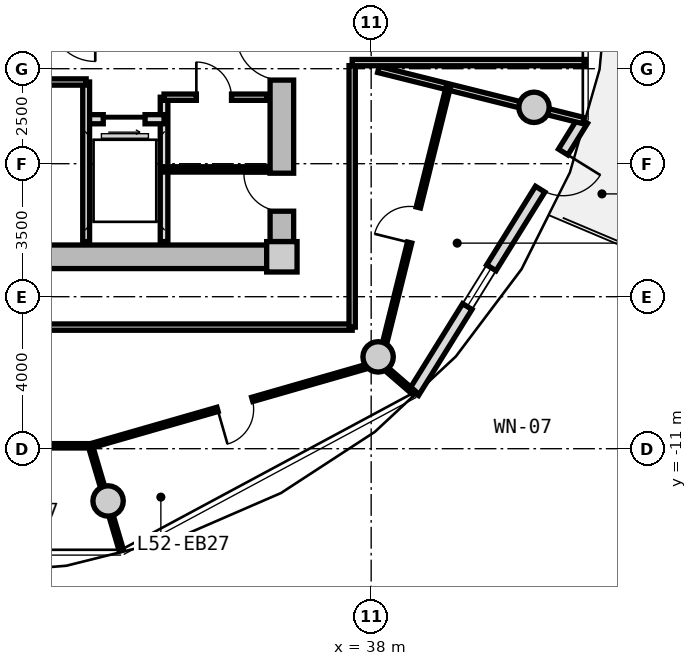
"""IFC4 building model, lengths in metres.
Left out: names, types, materials, properties, quantities, classifications, styles, units other than length and angle.
Written with IfcOpenShell. Run it as: python <this file> out.ifc"""

import sys

from ifc_helpers import new_model, si_unit, direction, frame, frame_2d, origin, origin_2d, place, context, subcontext, project, spatial, rectangle, circle, extrude, source, transform, mapped, element, fill, save


model = new_model("IFC4")
c1 = context("Model", 3, precision=1e-05, world=origin(), true_north=direction((0.0, 1.0)))
c2 = subcontext(c1, "Body", "Model", "MODEL_VIEW")
j1 = project(units=[si_unit("LENGTHUNIT", "METRE"), si_unit("PLANEANGLEUNIT", "RADIAN")], contexts=[c1])
p1 = place(None, origin())
s1 = spatial("IfcSite", under=j1, at=p1, CompositionType="ELEMENT")
p2 = place(p1, origin())
s2 = spatial("IfcBuilding", under=s1, at=p2, CompositionType="ELEMENT")
p3 = place(p2, frame((0.0, 0.0, 167.85)))
s3 = spatial("IfcBuildingStorey", under=s2, at=p3, CompositionType="ELEMENT", Elevation=167.85)
m1 = source(origin(), c2, "Body", "SweptSolid", [
    extrude(rectangle(XDim=0.8, YDim=0.8, at=origin_2d()), origin(), (0.0, 0.0, 1.0), 3.05),
])
p4 = place(p3, frame((35.65, -5.95, 0.0), z_axis=(0.0, 0.0, 1.0), x_axis=(1.0, 0.0, 0.0)))
e1 = element("IfcColumn", 1, at=p4, inside=s3, PredefinedType="COLUMN", context=c2, shape_type="MappedRepresentation", body=[
    mapped(m1, transform((0.0, 0.0, 0.0), x_axis=(1.0, 0.0, 0.0), y_axis=(0.0, 1.0, 0.0), z_axis=(0.0, 0.0, 1.0), scale=1.0)),
])
m2 = source(origin(), c2, "Body", "SweptSolid", [
    extrude(rectangle(XDim=14.5, YDim=0.62, at=frame_2d((7.25, 0.0))), origin(), (0.0, 0.0, 1.0), 2.81),
])
p5 = place(p3, frame((35.25, -5.95, 0.0), z_axis=(0.0, 0.0, 1.0), x_axis=(-1.0, 0.0, 0.0)))
e2 = element("IfcWall", 2, at=p5, inside=s3, PredefinedType="SHEAR", context=c2, shape_type="MappedRepresentation", body=[
    mapped(m2, transform((0.0, 0.0, 0.0), x_axis=(1.0, 0.0, 0.0), y_axis=(0.0, 1.0, 0.0), z_axis=(0.0, 0.0, 1.0), scale=1.0)),
])
m3 = source(origin(), c2, "Body", "SweptSolid", [
    extrude(rectangle(XDim=11.1, YDim=0.62, at=frame_2d((5.55, 0.0))), origin(), (0.0, 0.0, 1.0), 2.81),
])
p6 = place(p3, frame((35.65, 5.55, 0.0), z_axis=(0.0, 0.0, 1.0), x_axis=(0.0, -1.0, 0.0)))
e3 = element("IfcWall", 3, at=p6, inside=s3, PredefinedType="SHEAR", context=c2, shape_type="MappedRepresentation", body=[
    mapped(m3, transform((0.0, 0.0, 0.0), x_axis=(1.0, 0.0, 0.0), y_axis=(0.0, 1.0, 0.0), z_axis=(0.0, 0.0, 1.0), scale=1.0)),
])
p7 = place(p6, frame((5.65, 0.0, 0.0)))
e4 = element("IfcOpeningElement", 4, at=p7, cuts=e3, PredefinedType="OPENING", context=c2, shape_type="SweptSolid", body=[
    extrude(rectangle(XDim=1.2, YDim=2.15, at=frame_2d((0.6, 1.075))), frame((0.0, 0.32, 0.0), z_axis=(0.0, -1.0, 0.0), x_axis=(1.0, 0.0, 0.0)), (0.0, 0.0, 1.0), 0.64),
])
p8 = place(p6, frame((9.3, 0.0, 0.0)))
e5 = element("IfcOpeningElement", 5, at=p8, cuts=e3, PredefinedType="OPENING", context=c2, shape_type="SweptSolid", body=[
    extrude(rectangle(XDim=1.0, YDim=2.1, at=frame_2d((0.5, 1.05))), frame((0.0, 0.32, 0.0), z_axis=(0.0, -1.0, 0.0), x_axis=(1.0, 0.0, 0.0)), (0.0, 0.0, 1.0), 0.64),
])
m4 = source(origin(), c2, "Body", "SweptSolid", [
    extrude(circle(Radius=0.4, at=origin_2d()), origin(), (0.0, 0.0, 1.0), 3.05),
])
for number, where, z_axis, x_axis in (
    (6, (31.077, -12.375, 0.0), (0.0, 0.0, 1.0), (1.0, 0.0, 0.0)),
    (7, (38.183, -8.584, 0.0), (0.0, 0.0, 1.0), (1.0, 0.0, 0.0)),
    (8, (42.285, -2.016, 0.0), (0.0, 0.0, 1.0), (1.0, 0.0, 0.0)),
):
    element("IfcColumn", number, at=place(p3, frame(where, z_axis=z_axis, x_axis=x_axis)), inside=s3, PredefinedType="COLUMN", context=c2, shape_type="MappedRepresentation", body=[
        mapped(m4, transform((0.0, 0.0, 0.0), x_axis=(1.0, 0.0, 0.0), y_axis=(0.0, 1.0, 0.0), z_axis=(0.0, 0.0, 1.0), scale=1.0)),
    ])
m5 = source(origin(), c2, "Body", "SweptSolid", [
    extrude(rectangle(XDim=8.431, YDim=0.29, at=frame_2d((4.216, 0.0))), origin(), (0.0, 0.0, 1.0), 2.81),
])
p9 = place(p3, frame((43.57, -2.361, 0.0), z_axis=(0.0, 0.0, 1.0), x_axis=(-0.527377998418, -0.849630770855, 0.0)))
e9 = element("IfcWall", 9, at=p9, inside=s3, PredefinedType="SOLIDWALL", context=c2, shape_type="MappedRepresentation", body=[
    mapped(m5, transform((0.0, 0.0, 0.0), x_axis=(1.0, 0.0, 0.0), y_axis=(0.0, 1.0, 0.0), z_axis=(0.0, 0.0, 1.0), scale=1.0)),
])
p10 = place(p9, frame((0.98, 0.0, 0.0)))
e10 = element("IfcOpeningElement", 10, at=p10, cuts=e9, PredefinedType="OPENING", context=c2, shape_type="SweptSolid", body=[
    extrude(rectangle(XDim=1.15, YDim=2.25, at=frame_2d((0.575, 1.125))), frame((0.0, 0.155, 0.0), z_axis=(0.0, -1.0, 0.0), x_axis=(1.0, 0.0, 0.0)), (0.0, 0.0, 1.0), 0.31),
])
p11 = place(p9, frame((4.566, 0.0, 0.85)))
e11 = element("IfcOpeningElement", 11, at=p11, cuts=e9, PredefinedType="OPENING", context=c2, shape_type="SweptSolid", body=[
    extrude(rectangle(XDim=1.2, YDim=1.5, at=frame_2d((0.6, 0.75))), frame((0.0, 0.155, 0.0), z_axis=(0.0, -1.0, 0.0), x_axis=(1.0, 0.0, 0.0)), (0.0, 0.0, 1.0), 0.31),
])
m6 = source(origin(), c2, "Body", "SweptSolid", [
    extrude(rectangle(XDim=3.8, YDim=0.2, at=frame_2d((1.9, 0.0))), origin(), (0.0, 0.0, 1.0), 2.795),
])
p12 = place(p3, frame((32.55, -5.55, 0.0), z_axis=(0.0, 0.0, 1.0), x_axis=(0.0, 1.0, 0.0)))
e12 = element("IfcWall", 12, at=p12, inside=s3, PredefinedType="PARTITIONING", context=c2, shape_type="MappedRepresentation", body=[
    mapped(m6, transform((0.0, 0.0, 0.0), x_axis=(1.0, 0.0, 0.0), y_axis=(0.0, 1.0, 0.0), z_axis=(0.0, 0.0, 1.0), scale=1.0)),
])
m7 = source(origin(), c2, "Body", "SweptSolid", [
    extrude(rectangle(XDim=2.05, YDim=0.24, at=frame_2d((1.025, 0.0))), origin(), (0.0, 0.0, 1.0), 2.795),
])
p13 = place(p3, frame((30.5, -2.33, 0.0), z_axis=(0.0, 0.0, 1.0), x_axis=(1.0, 0.0, 0.0)))
e13 = element("IfcWall", 13, at=p13, inside=s3, PredefinedType="PARTITIONING", context=c2, shape_type="MappedRepresentation", body=[
    mapped(m7, transform((0.0, 0.0, 0.0), x_axis=(1.0, 0.0, 0.0), y_axis=(0.0, 1.0, 0.0), z_axis=(0.0, 0.0, 1.0), scale=1.0)),
])
p14 = place(p13, frame((0.45, 0.0, 0.0)))
e14 = element("IfcOpeningElement", 14, at=p14, cuts=e13, PredefinedType="OPENING", context=c2, shape_type="SweptSolid", body=[
    extrude(rectangle(XDim=1.1, YDim=2.2, at=frame_2d((0.55, 1.1))), frame((0.0, 0.13, 0.0), z_axis=(0.0, -1.0, 0.0), x_axis=(1.0, 0.0, 0.0)), (0.0, 0.0, 1.0), 0.26),
])
m8 = source(origin(), c2, "Body", "SweptSolid", [
    extrude(rectangle(XDim=4.2, YDim=0.18, at=frame_2d((2.1, 0.0))), origin(), (0.0, 0.0, 1.0), 2.795),
])
p15 = place(p3, frame((30.5, -5.55, 0.0), z_axis=(0.0, 0.0, 1.0), x_axis=(0.0, 1.0, 0.0)))
e15 = element("IfcWall", 15, at=p15, inside=s3, PredefinedType="PARTITIONING", context=c2, shape_type="MappedRepresentation", body=[
    mapped(m8, transform((0.0, 0.0, 0.0), x_axis=(1.0, 0.0, 0.0), y_axis=(0.0, 1.0, 0.0), z_axis=(0.0, 0.0, 1.0), scale=1.0)),
])
m9 = source(origin(), c2, "Body", "SweptSolid", [
    extrude(rectangle(XDim=4.77, YDim=0.165, at=frame_2d((2.385, 0.0))), origin(), (0.0, 0.0, 1.0), 2.795),
])
p16 = place(p3, frame((25.73, -1.35, 0.0), z_axis=(0.0, 0.0, 1.0), x_axis=(1.0, 0.0, 0.0)))
e16 = element("IfcWall", 16, at=p16, inside=s3, PredefinedType="PARTITIONING", context=c2, shape_type="MappedRepresentation", body=[
    mapped(m9, transform((0.0, 0.0, 0.0), x_axis=(1.0, 0.0, 0.0), y_axis=(0.0, 1.0, 0.0), z_axis=(0.0, 0.0, 1.0), scale=1.0)),
])
p17 = place(p16, frame((1.85, 0.0, 0.0)))
e17 = element("IfcOpeningElement", 17, at=p17, cuts=e16, PredefinedType="OPENING", context=c2, shape_type="SweptSolid", body=[
    extrude(rectangle(XDim=1.0, YDim=2.1, at=frame_2d((0.5, 1.05))), frame((0.0, 0.093, 0.0), z_axis=(0.0, -1.0, 0.0), x_axis=(1.0, 0.0, 0.0)), (0.0, 0.0, 1.0), 0.185),
])
m10 = source(origin(), c2, "Body", "SweptSolid", [
    extrude(rectangle(XDim=2.7, YDim=0.165, at=frame_2d((1.35, 0.0))), origin(), (0.0, 0.0, 1.0), 2.795),
])
p18 = place(p3, frame((32.55, -1.75, 0.0), z_axis=(0.0, 0.0, 1.0), x_axis=(1.0, 0.0, 0.0)))
e18 = element("IfcWall", 18, at=p18, inside=s3, PredefinedType="PARTITIONING", context=c2, shape_type="MappedRepresentation", body=[
    mapped(m10, transform((0.0, 0.0, 0.0), x_axis=(1.0, 0.0, 0.0), y_axis=(0.0, 1.0, 0.0), z_axis=(0.0, 0.0, 1.0), scale=1.0)),
])
p19 = place(p18, frame((0.85, 0.0, 0.0)))
e19 = element("IfcOpeningElement", 19, at=p19, cuts=e18, PredefinedType="OPENING", context=c2, shape_type="SweptSolid", body=[
    extrude(rectangle(XDim=0.925, YDim=2.1, at=frame_2d((0.462, 1.05))), frame((0.0, 0.093, 0.0), z_axis=(0.0, -1.0, 0.0), x_axis=(1.0, 0.0, 0.0)), (0.0, 0.0, 1.0), 0.185),
])
m11 = source(origin(), c2, "Body", "SweptSolid", [
    extrude(rectangle(XDim=2.7, YDim=0.14, at=frame_2d((1.35, 0.0))), origin(), (0.0, 0.0, 1.0), 2.795),
])
p20 = place(p3, frame((32.55, -3.65, 0.0), z_axis=(0.0, 0.0, 1.0), x_axis=(1.0, 0.0, 0.0)))
e20 = element("IfcWall", 20, at=p20, inside=s3, PredefinedType="PARTITIONING", context=c2, shape_type="MappedRepresentation", body=[
    mapped(m11, transform((0.0, 0.0, 0.0), x_axis=(1.0, 0.0, 0.0), y_axis=(0.0, 1.0, 0.0), z_axis=(0.0, 0.0, 1.0), scale=1.0)),
])
m12 = source(origin(), c2, "Body", "SweptSolid", [
    extrude(rectangle(XDim=19.0, YDim=0.165, at=frame_2d((9.5, 0.0))), origin(), (0.0, 0.0, 1.0), 2.795),
])
p21 = place(p3, frame((37.5, -7.8, 0.0), z_axis=(0.0, 0.0, 1.0), x_axis=(-1.0, 0.0, 0.0)))
e21 = element("IfcWall", 21, at=p21, inside=s3, PredefinedType="PARTITIONING", context=c2, shape_type="MappedRepresentation", body=[
    mapped(m12, transform((0.0, 0.0, 0.0), x_axis=(1.0, 0.0, 0.0), y_axis=(0.0, 1.0, 0.0), z_axis=(0.0, 0.0, 1.0), scale=1.0)),
])
p22 = place(p21, frame((8.061, 0.0, 0.0)))
e22 = element("IfcOpeningElement", 22, at=p22, cuts=e21, PredefinedType="OPENING", context=c2, shape_type="SweptSolid", body=[
    extrude(rectangle(XDim=1.05, YDim=2.15, at=frame_2d((0.525, 1.075))), frame((0.0, 0.093, 0.0), z_axis=(0.0, -1.0, 0.0), x_axis=(1.0, 0.0, 0.0)), (0.0, 0.0, 1.0), 0.185),
])
m13 = source(origin(), c2, "Body", "SweptSolid", [
    extrude(rectangle(XDim=6.88, YDim=0.165, at=frame_2d((3.44, 0.0))), origin(), (0.0, 0.0, 1.0), 2.795),
])
p23 = place(p3, frame((37.5, -0.92, 0.0), z_axis=(0.0, 0.0, 1.0), x_axis=(0.0, -1.0, 0.0)))
e23 = element("IfcWall", 23, at=p23, inside=s3, PredefinedType="PARTITIONING", context=c2, shape_type="MappedRepresentation", body=[
    mapped(m13, transform((0.0, 0.0, 0.0), x_axis=(1.0, 0.0, 0.0), y_axis=(0.0, 1.0, 0.0), z_axis=(0.0, 0.0, 1.0), scale=1.0)),
])
m14 = source(origin(), c2, "Body", "SweptSolid", [
    extrude(rectangle(XDim=5.564, YDim=0.165, at=frame_2d((2.782, 0.0))), origin(), (0.0, 0.0, 1.0), 2.345),
])
p24 = place(p3, frame((38.19, -1.02, 0.0), z_axis=(0.0, 0.0, 1.0), x_axis=(0.97031260977, -0.241854169533, 0.0)))
e24 = element("IfcWall", 24, at=p24, inside=s3, PredefinedType="PARTITIONING", context=c2, shape_type="MappedRepresentation", body=[
    mapped(m14, transform((0.0, 0.0, 0.0), x_axis=(1.0, 0.0, 0.0), y_axis=(0.0, 1.0, 0.0), z_axis=(0.0, 0.0, 1.0), scale=1.0)),
])
m15 = source(origin(), c2, "Body", "SweptSolid", [
    extrude(rectangle(XDim=6.139, YDim=0.165, at=frame_2d((3.069, 0.0))), origin(), (0.0, 0.0, 1.0), 2.795),
])
p25 = place(p3, frame((43.639, -0.84, 0.0), z_axis=(0.0, 0.0, 1.0), x_axis=(-1.0, 0.0, 0.0)))
e25 = element("IfcWall", 25, at=p25, inside=s3, PredefinedType="PARTITIONING", context=c2, shape_type="MappedRepresentation", body=[
    mapped(m15, transform((0.0, 0.0, 0.0), x_axis=(1.0, 0.0, 0.0), y_axis=(0.0, 1.0, 0.0), z_axis=(0.0, 0.0, 1.0), scale=1.0)),
])
m16 = source(origin(), c2, "Body", "SweptSolid", [
    extrude(rectangle(XDim=7.274, YDim=0.115, at=frame_2d((3.637, 0.0))), origin(), (0.0, 0.0, 1.0), 2.795),
])
p26 = place(p3, frame((23.338, -10.924, 0.0), z_axis=(0.0, 0.0, 1.0), x_axis=(1.0, 0.0, 0.0)))
e26 = element("IfcWall", 26, at=p26, inside=s3, PredefinedType="PARTITIONING", context=c2, shape_type="MappedRepresentation", body=[
    mapped(m16, transform((0.0, 0.0, 0.0), x_axis=(1.0, 0.0, 0.0), y_axis=(0.0, 1.0, 0.0), z_axis=(0.0, 0.0, 1.0), scale=1.0)),
])
p27 = place(p26, frame((3.162, 0.0, 0.0)))
e27 = element("IfcOpeningElement", 27, at=p27, cuts=e26, PredefinedType="OPENING", context=c2, shape_type="SweptSolid", body=[
    extrude(rectangle(XDim=0.95, YDim=2.1, at=frame_2d((0.475, 1.05))), frame((0.0, 0.067, 0.0), z_axis=(0.0, -1.0, 0.0), x_axis=(1.0, 0.0, 0.0)), (0.0, 0.0, 1.0), 0.135),
])
m17 = source(origin(), c2, "Body", "SweptSolid", [
    extrude(rectangle(XDim=7.911, YDim=0.115, at=frame_2d((3.955, 0.0))), origin(), (0.0, 0.0, 1.0), 2.345),
])
p28 = place(p3, frame((30.613, -10.927, 0.0), z_axis=(0.0, 0.0, 1.0), x_axis=(0.961104741235, 0.276184134908, 0.0)))
e28 = element("IfcWall", 28, at=p28, inside=s3, PredefinedType="PARTITIONING", context=c2, shape_type="MappedRepresentation", body=[
    mapped(m17, transform((0.0, 0.0, 0.0), x_axis=(1.0, 0.0, 0.0), y_axis=(0.0, 1.0, 0.0), z_axis=(0.0, 0.0, 1.0), scale=1.0)),
])
p29 = place(p28, frame((3.48, 0.0, 0.0)))
e29 = element("IfcOpeningElement", 29, at=p29, cuts=e28, PredefinedType="OPENING", context=c2, shape_type="SweptSolid", body=[
    extrude(rectangle(XDim=0.95, YDim=2.1, at=frame_2d((0.475, 1.05))), frame((0.0, 0.067, 0.0), z_axis=(0.0, -1.0, 0.0), x_axis=(1.0, 0.0, 0.0)), (0.0, 0.0, 1.0), 0.135),
])
m18 = source(origin(), c2, "Body", "SweptSolid", [
    extrude(rectangle(XDim=2.871, YDim=0.115, at=frame_2d((1.436, 0.0))), origin(), (0.0, 0.0, 1.0), 2.345),
])
p30 = place(p3, frame((30.613, -10.927, 0.0), z_axis=(0.0, 0.0, 1.0), x_axis=(0.283616326168, -0.958937839242, 0.0)))
e30 = element("IfcWall", 30, at=p30, inside=s3, PredefinedType="PARTITIONING", context=c2, shape_type="MappedRepresentation", body=[
    mapped(m18, transform((0.0, 0.0, 0.0), x_axis=(1.0, 0.0, 0.0), y_axis=(0.0, 1.0, 0.0), z_axis=(0.0, 0.0, 1.0), scale=1.0)),
])
m19 = source(origin(), c2, "Body", "SweptSolid", [
    extrude(rectangle(XDim=7.492, YDim=0.115, at=frame_2d((3.746, 0.0))), origin(), (0.0, 0.0, 1.0), 2.345),
])
p31 = place(p3, frame((38.223, -8.749, 0.0), z_axis=(0.0, 0.0, 1.0), x_axis=(0.24104782819, 0.970513237686, 0.0)))
e31 = element("IfcWall", 31, at=p31, inside=s3, PredefinedType="PARTITIONING", context=c2, shape_type="MappedRepresentation", body=[
    mapped(m19, transform((0.0, 0.0, 0.0), x_axis=(1.0, 0.0, 0.0), y_axis=(0.0, 1.0, 0.0), z_axis=(0.0, 0.0, 1.0), scale=1.0)),
])
p32 = place(p31, frame((3.271, 0.0, 0.0)))
e32 = element("IfcOpeningElement", 32, at=p32, cuts=e31, PredefinedType="OPENING", context=c2, shape_type="SweptSolid", body=[
    extrude(rectangle(XDim=0.95, YDim=2.1, at=frame_2d((0.475, 1.05))), frame((0.0, 0.067, 0.0), z_axis=(0.0, -1.0, 0.0), x_axis=(1.0, 0.0, 0.0)), (0.0, 0.0, 1.0), 0.135),
])
m20 = source(origin(), c2, "Body", "SweptSolid", [
    extrude(rectangle(XDim=1.208, YDim=0.115, at=frame_2d((0.604, 0.0))), origin(), (0.0, 0.0, 1.0), 2.795),
])
p33 = place(p3, frame((38.223, -8.749, 0.0), z_axis=(0.0, 0.0, 1.0), x_axis=(0.75668207681, -0.653783018008, 0.0)))
e33 = element("IfcWall", 33, at=p33, inside=s3, PredefinedType="PARTITIONING", context=c2, shape_type="MappedRepresentation", body=[
    mapped(m20, transform((0.0, 0.0, 0.0), x_axis=(1.0, 0.0, 0.0), y_axis=(0.0, 1.0, 0.0), z_axis=(0.0, 0.0, 1.0), scale=1.0)),
])
m21 = source(origin(), c2, "Body", "SweptSolid", [
    extrude(rectangle(XDim=1.15, YDim=2.25, at=frame_2d((0.575, 1.125))), frame((0.0, 0.025, 0.0), z_axis=(0.0, -1.0, 0.0), x_axis=(1.0, 0.0, 0.0)), (0.0, 0.0, 1.0), 0.05),
])
p34 = place(p10, origin())
e34 = element("IfcDoor", 34, at=p34, inside=s3, OperationType="SINGLE_SWING_LEFT", PredefinedType="DOOR", context=c2, shape_type="MappedRepresentation", body=[
    mapped(m21, transform((0.0, 0.0, 0.0), x_axis=(1.0, 0.0, 0.0), y_axis=(0.0, 1.0, 0.0), z_axis=(0.0, 0.0, 1.0), scale=1.0)),
])
fill(e10, e34)
m22 = source(origin(), c2, "Body", "SweptSolid", [
    extrude(rectangle(XDim=1.2, YDim=1.5, at=frame_2d((0.6, 0.75))), frame((0.0, 0.03, 0.0), z_axis=(0.0, -1.0, 0.0), x_axis=(1.0, 0.0, 0.0)), (0.0, 0.0, 1.0), 0.06),
])
p35 = place(p11, origin())
e35 = element("IfcWindow", 35, at=p35, inside=s3, PartitioningType="SINGLE_PANEL", PredefinedType="WINDOW", context=c2, shape_type="MappedRepresentation", body=[
    mapped(m22, transform((0.0, 0.0, 0.0), x_axis=(1.0, 0.0, 0.0), y_axis=(0.0, 1.0, 0.0), z_axis=(0.0, 0.0, 1.0), scale=1.0)),
])
fill(e11, e35)
m23 = source(origin(), c2, "Body", "SweptSolid", [
    extrude(rectangle(XDim=1.2, YDim=2.15, at=frame_2d((0.6, 1.075))), frame((0.0, 0.025, 0.0), z_axis=(0.0, -1.0, 0.0), x_axis=(1.0, 0.0, 0.0)), (0.0, 0.0, 1.0), 0.05),
])
p36 = place(p7, frame((1.2, 0.0, 0.0), z_axis=(0.0, 0.0, 1.0), x_axis=(-1.0, 0.0, 0.0)))
e36 = element("IfcDoor", 36, at=p36, inside=s3, OperationType="SINGLE_SWING_RIGHT", PredefinedType="DOOR", context=c2, shape_type="MappedRepresentation", body=[
    mapped(m23, transform((0.0, 0.0, 0.0), x_axis=(1.0, 0.0, 0.0), y_axis=(0.0, 1.0, 0.0), z_axis=(0.0, 0.0, 1.0), scale=1.0)),
])
fill(e4, e36)
m24 = source(origin(), c2, "Body", "SweptSolid", [
    extrude(rectangle(XDim=1.1, YDim=2.2, at=frame_2d((0.55, 1.1))), frame((0.0, 0.025, 0.0), z_axis=(0.0, -1.0, 0.0), x_axis=(1.0, 0.0, 0.0)), (0.0, 0.0, 1.0), 0.05),
])
p37 = place(p14, frame((1.1, 0.0, 0.0), z_axis=(0.0, 0.0, 1.0), x_axis=(-1.0, 0.0, 0.0)))
e37 = element("IfcDoor", 37, at=p37, inside=s3, OperationType="SLIDING_TO_RIGHT", PredefinedType="DOOR", context=c2, shape_type="MappedRepresentation", body=[
    mapped(m24, transform((0.0, 0.0, 0.0), x_axis=(1.0, 0.0, 0.0), y_axis=(0.0, 1.0, 0.0), z_axis=(0.0, 0.0, 1.0), scale=1.0)),
])
fill(e14, e37)
m25 = source(origin(), c2, "Body", "SweptSolid", [
    extrude(rectangle(XDim=0.925, YDim=2.1, at=frame_2d((0.462, 1.05))), frame((0.0, 0.025, 0.0), z_axis=(0.0, -1.0, 0.0), x_axis=(1.0, 0.0, 0.0)), (0.0, 0.0, 1.0), 0.05),
])
p38 = place(p19, origin())
e38 = element("IfcDoor", 38, at=p38, inside=s3, OperationType="SINGLE_SWING_LEFT", PredefinedType="DOOR", context=c2, shape_type="MappedRepresentation", body=[
    mapped(m25, transform((0.0, 0.0, 0.0), x_axis=(1.0, 0.0, 0.0), y_axis=(0.0, 1.0, 0.0), z_axis=(0.0, 0.0, 1.0), scale=1.0)),
])
fill(e19, e38)
m26 = source(origin(), c2, "Body", "SweptSolid", [
    extrude(rectangle(XDim=1.0, YDim=2.1, at=frame_2d((0.5, 1.05))), frame((0.0, 0.025, 0.0), z_axis=(0.0, -1.0, 0.0), x_axis=(1.0, 0.0, 0.0)), (0.0, 0.0, 1.0), 0.05),
])
p39 = place(p8, frame((1.0, 0.0, 0.0), z_axis=(0.0, 0.0, 1.0), x_axis=(-1.0, 0.0, 0.0)))
e39 = element("IfcDoor", 39, at=p39, inside=s3, OperationType="SINGLE_SWING_RIGHT", PredefinedType="DOOR", context=c2, shape_type="MappedRepresentation", body=[
    mapped(m26, transform((0.0, 0.0, 0.0), x_axis=(1.0, 0.0, 0.0), y_axis=(0.0, 1.0, 0.0), z_axis=(0.0, 0.0, 1.0), scale=1.0)),
])
fill(e5, e39)
m27 = source(origin(), c2, "Body", "SweptSolid", [
    extrude(rectangle(XDim=0.95, YDim=2.1, at=frame_2d((0.475, 1.05))), frame((0.0, 0.025, 0.0), z_axis=(0.0, -1.0, 0.0), x_axis=(1.0, 0.0, 0.0)), (0.0, 0.0, 1.0), 0.05),
])
p40 = place(p29, frame((0.95, 0.0, 0.0), z_axis=(0.0, 0.0, 1.0), x_axis=(-1.0, 0.0, 0.0)))
e40 = element("IfcDoor", 40, at=p40, inside=s3, OperationType="SINGLE_SWING_RIGHT", PredefinedType="DOOR", context=c2, shape_type="MappedRepresentation", body=[
    mapped(m27, transform((0.0, 0.0, 0.0), x_axis=(1.0, 0.0, 0.0), y_axis=(0.0, 1.0, 0.0), z_axis=(0.0, 0.0, 1.0), scale=1.0)),
])
fill(e29, e40)
p41 = place(p32, origin())
e41 = element("IfcDoor", 41, at=p41, inside=s3, OperationType="SINGLE_SWING_LEFT", PredefinedType="DOOR", context=c2, shape_type="MappedRepresentation", body=[
    mapped(m27, transform((0.0, 0.0, 0.0), x_axis=(1.0, 0.0, 0.0), y_axis=(0.0, 1.0, 0.0), z_axis=(0.0, 0.0, 1.0), scale=1.0)),
])
fill(e32, e41)
save(model, sys.argv[1])
